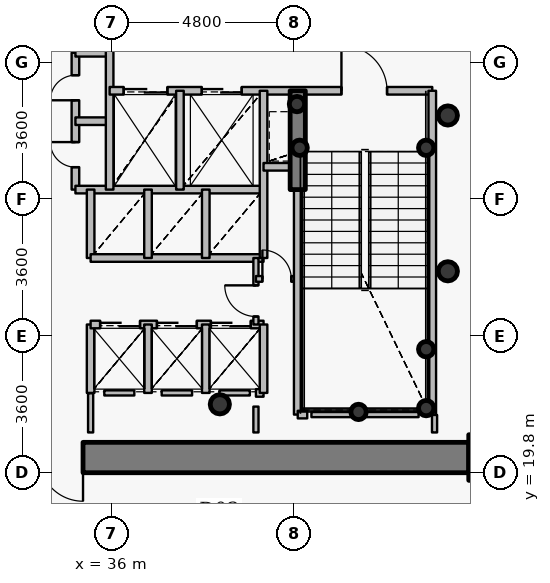
"""IFC4 building model, lengths in metres.
Left out: names, types, materials, properties, quantities, classifications, styles, units other than length and angle.
Written with IfcOpenShell. Run it as: python <this file> out.ifc"""

import sys

from ifc_helpers import new_model, si_unit, direction, frame, frame_2d, origin, origin_2d, place, context, subcontext, project, spatial, rectangle, hollow_circle, extrude, source, transform, mapped, element, fill, save


model = new_model("IFC4")
c1 = context("Model", 3, precision=1e-05, world=origin(), true_north=direction((0.0, 1.0)))
c2 = subcontext(c1, "Body", "Model", "MODEL_VIEW")
j1 = project(units=[si_unit("LENGTHUNIT", "METRE"), si_unit("PLANEANGLEUNIT", "RADIAN")], contexts=[c1])
p1 = place(None, origin())
s1 = spatial("IfcSite", under=j1, at=p1, CompositionType="ELEMENT")
p2 = place(p1, origin())
s2 = spatial("IfcBuilding", under=s1, at=p2, CompositionType="ELEMENT")
p3 = place(p2, frame((0.0, 0.0, 115.95)))
s3 = spatial("IfcBuildingStorey", under=s2, at=p3, CompositionType="ELEMENT", Elevation=115.95)
p4 = place(p3, frame((46.0, 20.2, 0.0), z_axis=(0.0, 0.0, 1.0), x_axis=(1.0, 0.0, 0.0)))
e1 = element("IfcColumn", 1, at=p4, inside=s3, PredefinedType="COLUMN", context=c2, shape_type="SweptSolid", body=[
    extrude(rectangle(XDim=1.2, YDim=1.2, at=origin_2d()), origin(), (0.0, 0.0, 1.0), 3.75),
])
p5 = place(p3, frame((38.85, 21.6, 0.0), z_axis=(0.0, 0.0, 1.0), x_axis=(1.0, 0.0, 0.0)))
e2 = element("IfcColumn", 2, at=p5, inside=s3, PredefinedType="COLUMN", context=c2, shape_type="SweptSolid", body=[
    extrude(hollow_circle(Radius=0.254, WallThickness=0.02, at=origin_2d()), origin(), (0.0, 0.0, 1.0), 3.75),
])
for number, where, z_axis, x_axis in (
    (3, (44.28, 21.5, 0.0), (0.0, 0.0, 1.0), (1.0, 0.0, 0.0)),
    (4, (44.28, 23.05, 0.0), (0.0, 0.0, 1.0), (1.0, 0.0, 0.0)),
    (5, (42.5, 21.4, 0.0), (0.0, 0.0, 1.0), (1.0, 0.0, 0.0)),
    (6, (40.95, 28.35, 0.0), (0.0, 0.0, 1.0), (1.0, 0.0, 0.0)),
    (7, (44.28, 28.35, 0.0), (0.0, 0.0, 1.0), (1.0, 0.0, 0.0)),
    (8, (40.88, 29.5, 0.0), (0.0, 0.0, 1.0), (1.0, 0.0, 0.0)),
):
    element("IfcColumn", number, at=place(p3, frame(where, z_axis=z_axis, x_axis=x_axis)), inside=s3, PredefinedType="COLUMN", context=c2, shape_type="SweptSolid", body=[
        extrude(hollow_circle(Radius=0.203, WallThickness=0.016, at=origin_2d()), origin(), (0.0, 0.0, 1.0), 3.75),
    ])
p6 = place(p3, frame((45.4, 20.2, 0.0), z_axis=(0.0, 0.0, 1.0), x_axis=(-1.0, 0.0, 0.0)))
e9 = element("IfcWall", 9, at=p6, inside=s3, PredefinedType="SHEAR", context=c2, shape_type="SweptSolid", body=[
    extrude(rectangle(XDim=18.8, YDim=0.8, at=frame_2d((9.4, 0.0))), origin(), (0.0, 0.0, 1.0), 2.95),
])
p7 = place(p6, frame((10.15, 0.0, 0.0)))
e10 = element("IfcOpeningElement", 10, at=p7, cuts=e9, PredefinedType="OPENING", context=c2, shape_type="SweptSolid", body=[
    extrude(rectangle(XDim=1.15, YDim=2.15, at=origin_2d()), frame((0.575, 0.41, 1.075), z_axis=(0.0, -1.0, 0.0), x_axis=(1.0, 0.0, 0.0)), (0.0, 0.0, 1.0), 0.82),
])
p8 = place(p3, frame((40.9, 27.25, 0.0), z_axis=(0.0, 0.0, 1.0), x_axis=(0.0, 1.0, 0.0)))
e11 = element("IfcWall", 11, at=p8, inside=s3, PredefinedType="SHEAR", context=c2, shape_type="SweptSolid", body=[
    extrude(rectangle(XDim=2.6, YDim=0.4, at=frame_2d((1.3, 0.0))), origin(), (0.0, 0.0, 1.0), 3.1),
])
for number, where, z_axis, x_axis in (
    (12, (44.85, 25.1, 0.0), (0.0, 0.0, 1.0), (1.0, 0.0, 0.0)),
    (13, (44.85, 29.2, 0.0), (0.0, 0.0, 1.0), (1.0, 0.0, 0.0)),
):
    element("IfcColumn", number, at=place(p3, frame(where, z_axis=z_axis, x_axis=x_axis)), inside=s3, PredefinedType="COLUMN", context=c2, shape_type="SweptSolid", body=[
        extrude(hollow_circle(Radius=0.254, WallThickness=0.02, at=origin_2d()), origin(), (0.0, 0.0, 1.0), 3.75),
    ])
p9 = place(p3, frame((35.05, 27.25, 0.0), z_axis=(0.0, 0.0, 1.0), x_axis=(0.0, 1.0, 0.0)))
e14 = element("IfcWall", 14, at=p9, inside=s3, PredefinedType="PARTITIONING", context=c2, shape_type="SweptSolid", body=[
    extrude(rectangle(XDim=3.6, YDim=0.2, at=frame_2d((1.8, 0.0))), origin(), (0.0, 0.0, 1.0), 3.5),
])
p10 = place(p9, frame((0.59, 0.0, 0.0)))
e15 = element("IfcOpeningElement", 15, at=p10, cuts=e14, PredefinedType="OPENING", context=c2, shape_type="SweptSolid", body=[
    extrude(rectangle(XDim=0.66, YDim=2.05, at=origin_2d()), frame((0.33, 0.11, 1.025), z_axis=(0.0, -1.0, 0.0), x_axis=(1.0, 0.0, 0.0)), (0.0, 0.0, 1.0), 0.22),
])
p11 = place(p9, frame((2.35, 0.0, 0.0)))
e16 = element("IfcOpeningElement", 16, at=p11, cuts=e14, PredefinedType="OPENING", context=c2, shape_type="SweptSolid", body=[
    extrude(rectangle(XDim=0.66, YDim=2.05, at=origin_2d()), frame((0.33, 0.11, 1.025), z_axis=(0.0, -1.0, 0.0), x_axis=(1.0, 0.0, 0.0)), (0.0, 0.0, 1.0), 0.22),
])
p12 = place(p3, frame((35.05, 27.25, 0.0), z_axis=(0.0, 0.0, 1.0), x_axis=(1.0, 0.0, 0.0)))
e17 = element("IfcWall", 17, at=p12, inside=s3, PredefinedType="PARTITIONING", context=c2, shape_type="SweptSolid", body=[
    extrude(rectangle(XDim=4.95, YDim=0.2, at=frame_2d((2.475, 0.0))), origin(), (0.0, 0.0, 1.0), 3.085),
])
for number, where, z_axis, x_axis in (
    (18, (35.05, 29.05, 0.0), (0.0, 0.0, 1.0), (1.0, 0.0, 0.0)),
    (19, (35.05, 30.85, 0.0), (0.0, 0.0, 1.0), (1.0, 0.0, 0.0)),
):
    element("IfcWall", number, at=place(p3, frame(where, z_axis=z_axis, x_axis=x_axis)), inside=s3, PredefinedType="PARTITIONING", context=c2, shape_type="SweptSolid", body=[
        extrude(rectangle(XDim=0.9, YDim=0.2, at=frame_2d((0.45, 0.0))), origin(), (0.0, 0.0, 1.0), 3.5),
    ])
p13 = place(p3, frame((35.45, 21.9, 0.0), z_axis=(0.0, 0.0, 1.0), x_axis=(0.0, 1.0, 0.0)))
e20 = element("IfcWall", 20, at=p13, inside=s3, PredefinedType="PARTITIONING", context=c2, shape_type="SweptSolid", body=[
    extrude(rectangle(XDim=1.8, YDim=0.2, at=frame_2d((0.9, 0.0))), origin(), (0.0, 0.0, 1.0), 3.5),
])
p14 = place(p3, frame((35.45, 23.7, 0.0), z_axis=(0.0, 0.0, 1.0), x_axis=(1.0, 0.0, 0.0)))
e21 = element("IfcWall", 21, at=p14, inside=s3, PredefinedType="PARTITIONING", context=c2, shape_type="SweptSolid", body=[
    extrude(rectangle(XDim=4.55, YDim=0.2, at=frame_2d((2.275, 0.0))), origin(), (0.0, 0.0, 1.0), 3.085),
])
p15 = place(p14, frame((0.25, 0.0, 0.0)))
e22 = element("IfcOpeningElement", 22, at=p15, cuts=e21, PredefinedType="OPENING", context=c2, shape_type="SweptSolid", body=[
    extrude(rectangle(XDim=1.05, YDim=2.15, at=origin_2d()), frame((0.525, 0.11, 1.075), z_axis=(0.0, -1.0, 0.0), x_axis=(1.0, 0.0, 0.0)), (0.0, 0.0, 1.0), 0.22),
])
p16 = place(p14, frame((1.745, 0.0, 0.0)))
e23 = element("IfcOpeningElement", 23, at=p16, cuts=e21, PredefinedType="OPENING", context=c2, shape_type="SweptSolid", body=[
    extrude(rectangle(XDim=1.05, YDim=2.15, at=origin_2d()), frame((0.525, 0.11, 1.075), z_axis=(0.0, -1.0, 0.0), x_axis=(1.0, 0.0, 0.0)), (0.0, 0.0, 1.0), 0.22),
])
p17 = place(p14, frame((3.165, 0.0, 0.0)))
e24 = element("IfcOpeningElement", 24, at=p17, cuts=e21, PredefinedType="OPENING", context=c2, shape_type="SweptSolid", body=[
    extrude(rectangle(XDim=1.05, YDim=2.15, at=origin_2d()), frame((0.525, 0.11, 1.075), z_axis=(0.0, -1.0, 0.0), x_axis=(1.0, 0.0, 0.0)), (0.0, 0.0, 1.0), 0.22),
])
p18 = place(p3, frame((35.45, 25.45, 0.0), z_axis=(0.0, 0.0, 1.0), x_axis=(0.0, 1.0, 0.0)))
e25 = element("IfcWall", 25, at=p18, inside=s3, PredefinedType="PARTITIONING", context=c2, shape_type="SweptSolid", body=[
    extrude(rectangle(XDim=1.8, YDim=0.2, at=frame_2d((0.9, 0.0))), origin(), (0.0, 0.0, 1.0), 3.5),
])
p19 = place(p3, frame((35.45, 25.45, 0.0), z_axis=(0.0, 0.0, 1.0), x_axis=(1.0, 0.0, 0.0)))
e26 = element("IfcWall", 26, at=p19, inside=s3, PredefinedType="PARTITIONING", context=c2, shape_type="SweptSolid", body=[
    extrude(rectangle(XDim=4.55, YDim=0.2, at=frame_2d((2.275, 0.0))), origin(), (0.0, 0.0, 1.0), 3.085),
])
p20 = place(p3, frame((35.95, 27.25, 0.0), z_axis=(0.0, 0.0, 1.0), x_axis=(0.0, 1.0, 0.0)))
e27 = element("IfcWall", 27, at=p20, inside=s3, PredefinedType="PARTITIONING", context=c2, shape_type="SweptSolid", body=[
    extrude(rectangle(XDim=3.8, YDim=0.2, at=frame_2d((1.9, 0.0))), origin(), (0.0, 0.0, 1.0), 3.5),
])
p21 = place(p3, frame((35.95, 29.85, 0.0), z_axis=(0.0, 0.0, 1.0), x_axis=(1.0, 0.0, 0.0)))
e28 = element("IfcWall", 28, at=p21, inside=s3, PredefinedType="PARTITIONING", context=c2, shape_type="SweptSolid", body=[
    extrude(rectangle(XDim=8.49, YDim=0.2, at=frame_2d((4.245, 0.0))), origin(), (0.0, 0.0, 1.0), 3.085),
])
p22 = place(p21, frame((6.1, 0.0, 0.0)))
e29 = element("IfcOpeningElement", 29, at=p22, cuts=e28, PredefinedType="OPENING", context=c2, shape_type="SweptSolid", body=[
    extrude(rectangle(XDim=1.2, YDim=2.15, at=origin_2d()), frame((0.6, 0.11, 1.075), z_axis=(0.0, -1.0, 0.0), x_axis=(1.0, 0.0, 0.0)), (0.0, 0.0, 1.0), 0.22),
])
p23 = place(p21, frame((0.37, 0.0, 0.0)))
e30 = element("IfcOpeningElement", 30, at=p23, cuts=e28, PredefinedType="OPENING", context=c2, shape_type="SweptSolid", body=[
    extrude(rectangle(XDim=1.15, YDim=2.15, at=origin_2d()), frame((0.575, 0.11, 1.075), z_axis=(0.0, -1.0, 0.0), x_axis=(1.0, 0.0, 0.0)), (0.0, 0.0, 1.0), 0.22),
])
p24 = place(p21, frame((2.425, 0.0, 0.0)))
e31 = element("IfcOpeningElement", 31, at=p24, cuts=e28, PredefinedType="OPENING", context=c2, shape_type="SweptSolid", body=[
    extrude(rectangle(XDim=1.05, YDim=2.15, at=origin_2d()), frame((0.525, 0.11, 1.075), z_axis=(0.0, -1.0, 0.0), x_axis=(1.0, 0.0, 0.0)), (0.0, 0.0, 1.0), 0.22),
])
for number, where, z_axis, x_axis in (
    (32, (36.96, 21.9, 0.0), (0.0, 0.0, 1.0), (0.0, 1.0, 0.0)),
    (33, (36.96, 25.45, 0.0), (0.0, 0.0, 1.0), (0.0, 1.0, 0.0)),
):
    element("IfcWall", number, at=place(p3, frame(where, z_axis=z_axis, x_axis=x_axis)), inside=s3, PredefinedType="PARTITIONING", context=c2, shape_type="SweptSolid", body=[
        extrude(rectangle(XDim=1.8, YDim=0.2, at=frame_2d((0.9, 0.0))), origin(), (0.0, 0.0, 1.0), 3.5),
    ])
p25 = place(p3, frame((37.8, 27.25, 0.0), z_axis=(0.0, 0.0, 1.0), x_axis=(0.0, 1.0, 0.0)))
e34 = element("IfcWall", 34, at=p25, inside=s3, PredefinedType="PARTITIONING", context=c2, shape_type="SweptSolid", body=[
    extrude(rectangle(XDim=2.6, YDim=0.2, at=frame_2d((1.3, 0.0))), origin(), (0.0, 0.0, 1.0), 3.5),
])
for number, where, z_axis, x_axis in (
    (35, (38.48, 21.9, 0.0), (0.0, 0.0, 1.0), (0.0, 1.0, 0.0)),
    (36, (38.48, 25.45, 0.0), (0.0, 0.0, 1.0), (0.0, 1.0, 0.0)),
):
    element("IfcWall", number, at=place(p3, frame(where, z_axis=z_axis, x_axis=x_axis)), inside=s3, PredefinedType="PARTITIONING", context=c2, shape_type="SweptSolid", body=[
        extrude(rectangle(XDim=1.8, YDim=0.2, at=frame_2d((0.9, 0.0))), origin(), (0.0, 0.0, 1.0), 3.5),
    ])
p26 = place(p3, frame((39.8, 21.9, 0.0), z_axis=(0.0, 0.0, 1.0), x_axis=(1.0, 0.0, 0.0)))
e37 = element("IfcWall", 37, at=p26, inside=s3, PredefinedType="PARTITIONING", context=c2, shape_type="SweptSolid", body=[
    extrude(rectangle(XDim=0.2, YDim=0.2, at=frame_2d((0.1, 0.0))), origin(), (0.0, 0.0, 1.0), 3.5),
])
p27 = place(p3, frame((39.8, 23.7, 0.0), z_axis=(0.0, 0.0, 1.0), x_axis=(0.0, 1.0, 0.0)))
e38 = element("IfcWall", 38, at=p27, inside=s3, PredefinedType="PARTITIONING", context=c2, shape_type="SweptSolid", body=[
    extrude(rectangle(XDim=1.75, YDim=0.135, at=frame_2d((0.875, 0.0))), origin(), (0.0, 0.0, 1.0), 3.5),
])
p28 = place(p27, frame((0.21, 0.0, 0.0)))
e39 = element("IfcOpeningElement", 39, at=p28, cuts=e38, PredefinedType="OPENING", context=c2, shape_type="SweptSolid", body=[
    extrude(rectangle(XDim=0.82, YDim=2.1, at=origin_2d()), frame((0.41, 0.078, 1.05), z_axis=(0.0, -1.0, 0.0), x_axis=(1.0, 0.0, 0.0)), (0.0, 0.0, 1.0), 0.155),
])
p29 = place(p3, frame((39.8, 24.9, 0.0), z_axis=(0.0, 0.0, 1.0), x_axis=(1.0, 0.0, 0.0)))
e40 = element("IfcWall", 40, at=p29, inside=s3, PredefinedType="PARTITIONING", context=c2, shape_type="SweptSolid", body=[
    extrude(rectangle(XDim=1.1, YDim=0.15, at=frame_2d((0.55, 0.0))), origin(), (0.0, 0.0, 1.0), 3.5),
])
p30 = place(p29, frame((0.17, 0.0, 0.0)))
e41 = element("IfcOpeningElement", 41, at=p30, cuts=e40, PredefinedType="OPENING", context=c2, shape_type="SweptSolid", body=[
    extrude(rectangle(XDim=0.76, YDim=2.1, at=origin_2d()), frame((0.38, 0.085, 1.05), z_axis=(0.0, -1.0, 0.0), x_axis=(1.0, 0.0, 0.0)), (0.0, 0.0, 1.0), 0.17),
])
p31 = place(p3, frame((40.0, 21.9, 0.0), z_axis=(0.0, 0.0, 1.0), x_axis=(0.0, 1.0, 0.0)))
e42 = element("IfcWall", 42, at=p31, inside=s3, PredefinedType="PARTITIONING", context=c2, shape_type="SweptSolid", body=[
    extrude(rectangle(XDim=1.8, YDim=0.2, at=frame_2d((0.9, 0.0))), origin(), (0.0, 0.0, 1.0), 3.5),
])
p32 = place(p3, frame((40.0, 25.45, 0.0), z_axis=(0.0, 0.0, 1.0), x_axis=(0.0, 1.0, 0.0)))
e43 = element("IfcWall", 43, at=p32, inside=s3, PredefinedType="PARTITIONING", context=c2, shape_type="SweptSolid", body=[
    extrude(rectangle(XDim=4.4, YDim=0.2, at=frame_2d((2.2, 0.0))), origin(), (0.0, 0.0, 1.0), 3.5),
])
p33 = place(p3, frame((40.0, 27.85, 0.0), z_axis=(0.0, 0.0, 1.0), x_axis=(1.0, 0.0, 0.0)))
e44 = element("IfcWall", 44, at=p33, inside=s3, PredefinedType="PARTITIONING", context=c2, shape_type="SweptSolid", body=[
    extrude(rectangle(XDim=0.9, YDim=0.2, at=frame_2d((0.45, 0.0))), origin(), (0.0, 0.0, 1.0), 3.5),
])
p34 = place(p3, frame((40.9, 21.33, 0.0), z_axis=(0.0, 0.0, 1.0), x_axis=(0.0, 1.0, 0.0)))
e45 = element("IfcWall", 45, at=p34, inside=s3, PredefinedType="PARTITIONING", context=c2, shape_type="SweptSolid", body=[
    extrude(rectangle(XDim=5.91, YDim=0.2, at=frame_2d((2.955, 0.0))), origin(), (0.0, 0.0, 1.0), 3.035),
])
p35 = place(p3, frame((40.9, 21.33, 0.0), z_axis=(0.0, 0.0, 1.0), x_axis=(1.0, 0.0, 0.0)))
e46 = element("IfcWall", 46, at=p35, inside=s3, PredefinedType="PARTITIONING", context=c2, shape_type="SweptSolid", body=[
    extrude(rectangle(XDim=0.25, YDim=0.2, at=frame_2d((0.125, 0.0))), origin(), (0.0, 0.0, 1.0), 3.035),
])
p36 = place(p3, frame((44.44, 21.33, 0.0), z_axis=(0.0, 0.0, 1.0), x_axis=(0.0, 1.0, 0.0)))
e47 = element("IfcWall", 47, at=p36, inside=s3, PredefinedType="PARTITIONING", context=c2, shape_type="SweptSolid", body=[
    extrude(rectangle(XDim=8.52, YDim=0.2, at=frame_2d((4.26, 0.0))), origin(), (0.0, 0.0, 1.0), 3.5),
])
p37 = place(p3, frame((44.08, 21.33, 0.0), z_axis=(0.0, 0.0, 1.0), x_axis=(-1.0, 0.0, 0.0)))
e48 = element("IfcWall", 48, at=p37, inside=s3, PredefinedType="PARTITIONING", context=c2, shape_type="SweptSolid", body=[
    extrude(rectangle(XDim=2.82, YDim=0.135, at=frame_2d((1.41, 0.0))), origin(), (0.0, 0.0, 1.0), 3.035),
])
p38 = place(p3, frame((36.6, 21.9, 0.0), z_axis=(0.0, 0.0, 1.0), x_axis=(-1.0, 0.0, 0.0)))
e49 = element("IfcWall", 49, at=p38, inside=s3, PredefinedType="PARTITIONING", context=c2, shape_type="SweptSolid", body=[
    extrude(rectangle(XDim=0.79, YDim=0.135, at=frame_2d((0.395, 0.0))), origin(), (0.0, 0.0, 1.0), 3.5),
])
p39 = place(p3, frame((38.12, 21.9, 0.0), z_axis=(0.0, 0.0, 1.0), x_axis=(-1.0, 0.0, 0.0)))
e50 = element("IfcWall", 50, at=p39, inside=s3, PredefinedType="PARTITIONING", context=c2, shape_type="SweptSolid", body=[
    extrude(rectangle(XDim=0.8, YDim=0.135, at=frame_2d((0.4, 0.0))), origin(), (0.0, 0.0, 1.0), 3.5),
])
p40 = place(p3, frame((39.64, 21.9, 0.0), z_axis=(0.0, 0.0, 1.0), x_axis=(-1.0, 0.0, 0.0)))
e51 = element("IfcWall", 51, at=p40, inside=s3, PredefinedType="PARTITIONING", context=c2, shape_type="SweptSolid", body=[
    extrude(rectangle(XDim=0.8, YDim=0.135, at=frame_2d((0.4, 0.0))), origin(), (0.0, 0.0, 1.0), 3.085),
])
p41 = place(p3, frame((39.8, 20.86, 0.0), z_axis=(0.0, 0.0, 1.0), x_axis=(0.0, 1.0, 0.0)))
e52 = element("IfcWall", 52, at=p41, inside=s3, PredefinedType="PARTITIONING", context=c2, shape_type="SweptSolid", body=[
    extrude(rectangle(XDim=0.68, YDim=0.135, at=frame_2d((0.34, 0.0))), origin(), (0.0, 0.0, 1.0), 3.035),
])
p42 = place(p3, frame((44.5, 20.86, 0.0), z_axis=(0.0, 0.0, 1.0), x_axis=(0.0, 1.0, 0.0)))
e53 = element("IfcWall", 53, at=p42, inside=s3, PredefinedType="PARTITIONING", context=c2, shape_type="SweptSolid", body=[
    extrude(rectangle(XDim=0.46, YDim=0.135, at=frame_2d((0.23, 0.0))), origin(), (0.0, 0.0, 1.0), 3.5),
])
p43 = place(p3, frame((35.45, 21.89, 0.0), z_axis=(0.0, 0.0, 1.0), x_axis=(0.0, -1.0, 0.0)))
e54 = element("IfcWall", 54, at=p43, inside=s3, PredefinedType="PARTITIONING", context=c2, shape_type="SweptSolid", body=[
    extrude(rectangle(XDim=1.03, YDim=0.135, at=frame_2d((0.515, 0.0))), origin(), (0.0, 0.0, 1.0), 3.085),
])
p44 = place(p3, frame((45.41, 19.8, 0.0), z_axis=(0.0, 0.0, 1.0), x_axis=(1.0, 0.0, 0.0)))
e55 = element("IfcWall", 55, at=p44, inside=s3, PredefinedType="PARTITIONING", context=c2, shape_type="SweptSolid", body=[
    extrude(rectangle(XDim=0.99, YDim=0.135, at=frame_2d((0.495, 0.0))), origin(), (0.0, 0.0, 1.0), 2.935),
])
m1 = source(origin(), c2, "Body", "SweptSolid", [
    extrude(rectangle(XDim=1.15, YDim=2.15, at=origin_2d()), frame((0.575, 0.025, 1.075), z_axis=(0.0, -1.0, 0.0), x_axis=(1.0, 0.0, 0.0)), (0.0, 0.0, 1.0), 0.05),
])
p45 = place(p7, origin())
e56 = element("IfcDoor", 56, at=p45, inside=s3, OperationType="SINGLE_SWING_LEFT", PredefinedType="DOOR", context=c2, shape_type="MappedRepresentation", body=[
    mapped(m1, transform((0.0, 0.0, 0.0), x_axis=(1.0, 0.0, 0.0), y_axis=(0.0, 1.0, 0.0), z_axis=(0.0, 0.0, 1.0), scale=1.0)),
])
fill(e10, e56)
m2 = source(origin(), c2, "Body", "SweptSolid", [
    extrude(rectangle(XDim=1.2, YDim=2.15, at=origin_2d()), frame((0.6, 0.025, 1.075), z_axis=(0.0, -1.0, 0.0), x_axis=(1.0, 0.0, 0.0)), (0.0, 0.0, 1.0), 0.05),
])
p46 = place(p22, origin())
e57 = element("IfcDoor", 57, at=p46, inside=s3, OperationType="SINGLE_SWING_LEFT", PredefinedType="DOOR", context=c2, shape_type="MappedRepresentation", body=[
    mapped(m2, transform((0.0, 0.0, 0.0), x_axis=(1.0, 0.0, 0.0), y_axis=(0.0, 1.0, 0.0), z_axis=(0.0, 0.0, 1.0), scale=1.0)),
])
fill(e29, e57)
m3 = source(origin(), c2, "Body", "SweptSolid", [
    extrude(rectangle(XDim=1.15, YDim=2.15, at=origin_2d()), frame((0.575, 0.025, 1.075), z_axis=(0.0, -1.0, 0.0), x_axis=(1.0, 0.0, 0.0)), (0.0, 0.0, 1.0), 0.05),
])
p47 = place(p23, origin())
e58 = element("IfcDoor", 58, at=p47, inside=s3, OperationType="DOUBLE_DOOR_SLIDING", PredefinedType="USERDEFINED", context=c2, shape_type="MappedRepresentation", body=[
    mapped(m3, transform((0.0, 0.0, 0.0), x_axis=(1.0, 0.0, 0.0), y_axis=(0.0, 1.0, 0.0), z_axis=(0.0, 0.0, 1.0), scale=1.0)),
])
fill(e30, e58)
m4 = source(origin(), c2, "Body", "SweptSolid", [
    extrude(rectangle(XDim=1.05, YDim=2.15, at=origin_2d()), frame((0.525, 0.025, 1.075), z_axis=(0.0, -1.0, 0.0), x_axis=(1.0, 0.0, 0.0)), (0.0, 0.0, 1.0), 0.05),
])
p48 = place(p24, origin())
e59 = element("IfcDoor", 59, at=p48, inside=s3, OperationType="DOUBLE_DOOR_SLIDING", PredefinedType="USERDEFINED", context=c2, shape_type="MappedRepresentation", body=[
    mapped(m4, transform((0.0, 0.0, 0.0), x_axis=(1.0, 0.0, 0.0), y_axis=(0.0, 1.0, 0.0), z_axis=(0.0, 0.0, 1.0), scale=1.0)),
])
fill(e31, e59)
p49 = place(p15, origin())
e60 = element("IfcDoor", 60, at=p49, inside=s3, OperationType="DOUBLE_DOOR_SLIDING", PredefinedType="USERDEFINED", context=c2, shape_type="MappedRepresentation", body=[
    mapped(m4, transform((0.0, 0.0, 0.0), x_axis=(1.0, 0.0, 0.0), y_axis=(0.0, 1.0, 0.0), z_axis=(0.0, 0.0, 1.0), scale=1.0)),
])
fill(e22, e60)
p50 = place(p16, origin())
e61 = element("IfcDoor", 61, at=p50, inside=s3, OperationType="DOUBLE_DOOR_SLIDING", PredefinedType="USERDEFINED", context=c2, shape_type="MappedRepresentation", body=[
    mapped(m4, transform((0.0, 0.0, 0.0), x_axis=(1.0, 0.0, 0.0), y_axis=(0.0, 1.0, 0.0), z_axis=(0.0, 0.0, 1.0), scale=1.0)),
])
fill(e23, e61)
p51 = place(p17, origin())
e62 = element("IfcDoor", 62, at=p51, inside=s3, OperationType="DOUBLE_DOOR_SLIDING", PredefinedType="USERDEFINED", context=c2, shape_type="MappedRepresentation", body=[
    mapped(m4, transform((0.0, 0.0, 0.0), x_axis=(1.0, 0.0, 0.0), y_axis=(0.0, 1.0, 0.0), z_axis=(0.0, 0.0, 1.0), scale=1.0)),
])
fill(e24, e62)
m5 = source(origin(), c2, "Body", "SweptSolid", [
    extrude(rectangle(XDim=0.66, YDim=2.05, at=origin_2d()), frame((0.33, 0.025, 1.025), z_axis=(0.0, -1.0, 0.0), x_axis=(1.0, 0.0, 0.0)), (0.0, 0.0, 1.0), 0.05),
])
p52 = place(p10, origin())
e63 = element("IfcDoor", 63, at=p52, inside=s3, OperationType="SINGLE_SWING_RIGHT", PredefinedType="USERDEFINED", context=c2, shape_type="MappedRepresentation", body=[
    mapped(m5, transform((0.0, 0.0, 0.0), x_axis=(1.0, 0.0, 0.0), y_axis=(0.0, 1.0, 0.0), z_axis=(0.0, 0.0, 1.0), scale=1.0)),
])
fill(e15, e63)
p53 = place(p11, origin())
e64 = element("IfcDoor", 64, at=p53, inside=s3, OperationType="SINGLE_SWING_LEFT", PredefinedType="USERDEFINED", context=c2, shape_type="MappedRepresentation", body=[
    mapped(m5, transform((0.0, 0.0, 0.0), x_axis=(1.0, 0.0, 0.0), y_axis=(0.0, 1.0, 0.0), z_axis=(0.0, 0.0, 1.0), scale=1.0)),
])
fill(e16, e64)
m6 = source(origin(), c2, "Body", "SweptSolid", [
    extrude(rectangle(XDim=0.82, YDim=2.1, at=origin_2d()), frame((0.41, 0.025, 1.05), z_axis=(0.0, -1.0, 0.0), x_axis=(1.0, 0.0, 0.0)), (0.0, 0.0, 1.0), 0.05),
])
p54 = place(p28, origin())
e65 = element("IfcDoor", 65, at=p54, inside=s3, OperationType="SINGLE_SWING_RIGHT", PredefinedType="DOOR", context=c2, shape_type="MappedRepresentation", body=[
    mapped(m6, transform((0.0, 0.0, 0.0), x_axis=(1.0, 0.0, 0.0), y_axis=(0.0, 1.0, 0.0), z_axis=(0.0, 0.0, 1.0), scale=1.0)),
])
fill(e39, e65)
m7 = source(origin(), c2, "Body", "SweptSolid", [
    extrude(rectangle(XDim=0.76, YDim=2.1, at=origin_2d()), frame((0.38, 0.025, 1.05), z_axis=(0.0, -1.0, 0.0), x_axis=(1.0, 0.0, 0.0)), (0.0, 0.0, 1.0), 0.05),
])
p55 = place(p30, origin())
e66 = element("IfcDoor", 66, at=p55, inside=s3, OperationType="SINGLE_SWING_LEFT", PredefinedType="DOOR", context=c2, shape_type="MappedRepresentation", body=[
    mapped(m7, transform((0.0, 0.0, 0.0), x_axis=(1.0, 0.0, 0.0), y_axis=(0.0, 1.0, 0.0), z_axis=(0.0, 0.0, 1.0), scale=1.0)),
])
fill(e41, e66)
save(model, sys.argv[1])
